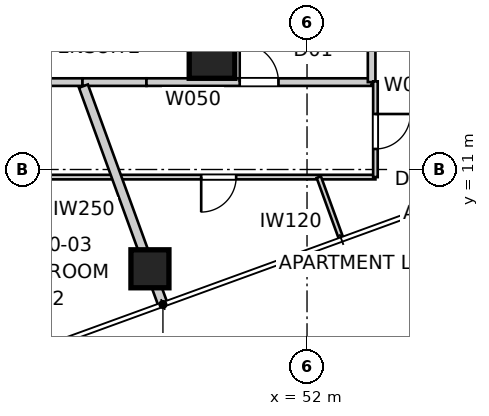
"""IFC4 building model, lengths in metres.
Left out: names, types, materials, properties, quantities, classifications, styles, units other than length and angle.
Written with IfcOpenShell. Run it as: python <this file> out.ifc"""

import sys

from ifc_helpers import new_model, si_unit, direction, frame, frame_2d, origin, origin_2d, place, context, subcontext, project, spatial, rectangle, extrude, element, fill, save


model = new_model("IFC4")
c1 = context("Model", 3, precision=1e-05, world=origin(), true_north=direction((0.0, 1.0)))
c2 = subcontext(c1, "Body", "Model", "MODEL_VIEW")
j1 = project(units=[si_unit("LENGTHUNIT", "METRE"), si_unit("PLANEANGLEUNIT", "RADIAN")], contexts=[c1])
p1 = place(None, origin())
s1 = spatial("IfcSite", under=j1, at=p1, CompositionType="ELEMENT")
p2 = place(p1, origin())
s2 = spatial("IfcBuilding", under=s1, at=p2, CompositionType="ELEMENT")
p3 = place(p2, frame((0.0, 0.0, 147.2)))
s3 = spatial("IfcBuildingStorey", under=s2, at=p3, CompositionType="ELEMENT", Elevation=147.2)
p4 = place(p3, frame((47.866, 8.387, 0.0), z_axis=(0.0, 0.0, 1.0), x_axis=(1.0, 0.0, 0.0)))
e1 = element("IfcColumn", 1, at=p4, inside=s3, PredefinedType="COLUMN", context=c2, shape_type="SweptSolid", body=[
    extrude(rectangle(XDim=1.0, YDim=1.0, at=origin_2d()), origin(), (0.0, 0.0, 1.0), 3.4),
])
p5 = place(p3, frame((49.5, 14.0, 0.0), z_axis=(0.0, 0.0, 1.0), x_axis=(1.0, 0.0, 0.0)))
e2 = element("IfcColumn", 2, at=p5, inside=s3, PredefinedType="COLUMN", context=c2, shape_type="SweptSolid", body=[
    extrude(rectangle(XDim=1.2, YDim=1.2, at=origin_2d()), origin(), (0.0, 0.0, 1.0), 3.4),
])
p6 = place(p3, frame((33.908, 13.3, 0.0), z_axis=(0.0, 0.0, 1.0), x_axis=(1.0, 0.0, 0.0)))
e3 = element("IfcWall", 3, at=p6, inside=s3, PredefinedType="PARTITIONING", context=c2, shape_type="SweptSolid", body=[
    extrude(rectangle(XDim=12.183, YDim=0.2, at=frame_2d((6.092, 0.0))), origin(), (0.0, 0.0, 1.0), 3.25),
])
p7 = place(p3, frame((46.092, 13.3, 0.0), z_axis=(0.0, 0.0, 1.0), x_axis=(1.0, 0.0, 0.0)))
e4 = element("IfcWall", 4, at=p7, inside=s3, PredefinedType="PARTITIONING", context=c2, shape_type="SweptSolid", body=[
    extrude(rectangle(XDim=1.684, YDim=0.2, at=frame_2d((0.842, 0.0))), origin(), (0.0, 0.0, 1.0), 2.55),
])
p8 = place(p3, frame((47.775, 13.3, 0.0), z_axis=(0.0, 0.0, 1.0), x_axis=(1.0, 0.0, 0.0)))
e5 = element("IfcWall", 5, at=p8, inside=s3, PredefinedType="PARTITIONING", context=c2, shape_type="SweptSolid", body=[
    extrude(rectangle(XDim=5.925, YDim=0.2, at=frame_2d((2.962, 0.0))), origin(), (0.0, 0.0, 1.0), 3.25),
])
p9 = place(p8, frame((2.453, 0.0, 0.0)))
e6 = element("IfcOpeningElement", 6, at=p9, cuts=e5, PredefinedType="OPENING", context=c2, shape_type="SweptSolid", body=[
    extrude(rectangle(XDim=1.02, YDim=2.34, at=frame_2d((0.51, 1.17))), frame((0.0, 0.11, 0.0), z_axis=(0.0, -1.0, 0.0), x_axis=(1.0, 0.0, 0.0)), (0.0, 0.0, 1.0), 0.22),
])
p10 = place(p3, frame((53.7, 13.3, 0.0), z_axis=(0.0, 0.0, 1.0), x_axis=(0.0, 1.0, 0.0)))
e7 = element("IfcWall", 7, at=p10, inside=s3, PredefinedType="PARTITIONING", context=c2, shape_type="SweptSolid", body=[
    extrude(rectangle(XDim=33.0, YDim=0.2, at=frame_2d((16.5, 0.0))), origin(), (0.0, 0.0, 1.0), 3.25),
])
p11 = place(p10, frame((28.411, 0.0, 0.0)))
e8 = element("IfcOpeningElement", 8, at=p11, cuts=e7, PredefinedType="OPENING", context=c2, shape_type="SweptSolid", body=[
    extrude(rectangle(XDim=1.02, YDim=2.1, at=frame_2d((0.51, 1.05))), frame((0.0, 0.11, 0.0), z_axis=(0.0, -1.0, 0.0), x_axis=(1.0, 0.0, 0.0)), (0.0, 0.0, 1.0), 0.22),
])
p12 = place(p10, frame((13.741, 0.0, 0.0)))
e9 = element("IfcOpeningElement", 9, at=p12, cuts=e7, PredefinedType="OPENING", context=c2, shape_type="SweptSolid", body=[
    extrude(rectangle(XDim=1.02, YDim=2.34, at=frame_2d((0.51, 1.17))), frame((0.0, 0.11, 0.0), z_axis=(0.0, -1.0, 0.0), x_axis=(1.0, 0.0, 0.0)), (0.0, 0.0, 1.0), 0.22),
])
p13 = place(p3, frame((48.208, 7.447, 0.0), z_axis=(0.0, 0.0, 1.0), x_axis=(-0.341999444481, 0.939700154291, 0.0)))
e10 = element("IfcWall", 10, at=p13, inside=s3, PredefinedType="PARTITIONING", context=c2, shape_type="SweptSolid", body=[
    extrude(rectangle(XDim=6.116, YDim=0.25, at=frame_2d((3.058, 0.0))), origin(), (0.0, 0.0, 1.0), 3.25),
])
p14 = place(p3, frame((53.8, 10.8, 0.0), z_axis=(0.0, 0.0, 1.0), x_axis=(-1.0, 0.0, 0.0)))
e11 = element("IfcWall", 11, at=p14, inside=s3, PredefinedType="PARTITIONING", context=c2, shape_type="SweptSolid", body=[
    extrude(rectangle(XDim=17.884, YDim=0.12, at=frame_2d((8.942, 0.0))), origin(), (0.0, 0.0, 1.0), 3.25),
])
p15 = place(p14, frame((3.665, 0.0, 0.0)))
e12 = element("IfcOpeningElement", 12, at=p15, cuts=e11, PredefinedType="OPENING", context=c2, shape_type="SweptSolid", body=[
    extrude(rectangle(XDim=0.92, YDim=2.34, at=frame_2d((0.46, 1.17))), frame((0.0, 0.07, 0.0), z_axis=(0.0, -1.0, 0.0), x_axis=(1.0, 0.0, 0.0)), (0.0, 0.0, 1.0), 0.14),
])
p16 = place(p14, frame((14.497, 0.0, 0.0)))
e13 = element("IfcOpeningElement", 13, at=p16, cuts=e11, PredefinedType="OPENING", context=c2, shape_type="SweptSolid", body=[
    extrude(rectangle(XDim=0.96, YDim=2.1, at=frame_2d((0.48, 1.05))), frame((0.0, 0.07, 0.0), z_axis=(0.0, -1.0, 0.0), x_axis=(1.0, 0.0, 0.0)), (0.0, 0.0, 1.0), 0.14),
])
p17 = place(p3, frame((53.8, 13.32, 0.0), z_axis=(0.0, 0.0, 1.0), x_axis=(0.0, -1.0, 0.0)))
e14 = element("IfcWall", 14, at=p17, inside=s3, PredefinedType="PARTITIONING", context=c2, shape_type="SweptSolid", body=[
    extrude(rectangle(XDim=2.52, YDim=0.12, at=frame_2d((1.26, 0.0))), origin(), (0.0, 0.0, 1.0), 3.25),
])
p18 = place(p17, frame((0.86, 0.0, 0.0)))
e15 = element("IfcOpeningElement", 15, at=p18, cuts=e14, PredefinedType="OPENING", context=c2, shape_type="SweptSolid", body=[
    extrude(rectangle(XDim=0.92, YDim=2.34, at=frame_2d((0.46, 1.17))), frame((0.0, 0.07, 0.0), z_axis=(0.0, -1.0, 0.0), x_axis=(1.0, 0.0, 0.0)), (0.0, 0.0, 1.0), 0.14),
])
p19 = place(p3, frame((52.893, 9.195, 0.0), z_axis=(0.0, 0.0, 1.0), x_axis=(-0.342052919471, 0.939680690597, 0.0)))
e16 = element("IfcWall", 16, at=p19, inside=s3, PredefinedType="PARTITIONING", context=c2, shape_type="SweptSolid", body=[
    extrude(rectangle(XDim=1.708, YDim=0.12, at=frame_2d((0.854, 0.0))), origin(), (0.0, 0.0, 1.0), 3.25),
])
p20 = place(p9, origin())
e17 = element("IfcDoor", 17, at=p20, inside=s3, OperationType="SINGLE_SWING_LEFT", PredefinedType="DOOR", context=c2, shape_type="SweptSolid", body=[
    extrude(rectangle(XDim=1.02, YDim=2.34, at=frame_2d((0.51, 1.17))), frame((0.0, 0.025, 0.0), z_axis=(0.0, -1.0, 0.0), x_axis=(1.0, 0.0, 0.0)), (0.0, 0.0, 1.0), 0.05),
])
fill(e6, e17)
p21 = place(p15, origin())
e18 = element("IfcDoor", 18, at=p21, inside=s3, OperationType="SINGLE_SWING_RIGHT", PredefinedType="DOOR", context=c2, shape_type="SweptSolid", body=[
    extrude(rectangle(XDim=0.92, YDim=2.34, at=frame_2d((0.46, 1.17))), frame((0.0, 0.025, 0.0), z_axis=(0.0, -1.0, 0.0), x_axis=(1.0, 0.0, 0.0)), (0.0, 0.0, 1.0), 0.05),
])
fill(e12, e18)
p22 = place(p18, origin())
e19 = element("IfcDoor", 19, at=p22, inside=s3, OperationType="SINGLE_SWING_LEFT", PredefinedType="DOOR", context=c2, shape_type="SweptSolid", body=[
    extrude(rectangle(XDim=0.92, YDim=2.34, at=frame_2d((0.46, 1.17))), frame((0.0, 0.025, 0.0), z_axis=(0.0, -1.0, 0.0), x_axis=(1.0, 0.0, 0.0)), (0.0, 0.0, 1.0), 0.05),
])
fill(e15, e19)
save(model, sys.argv[1])
